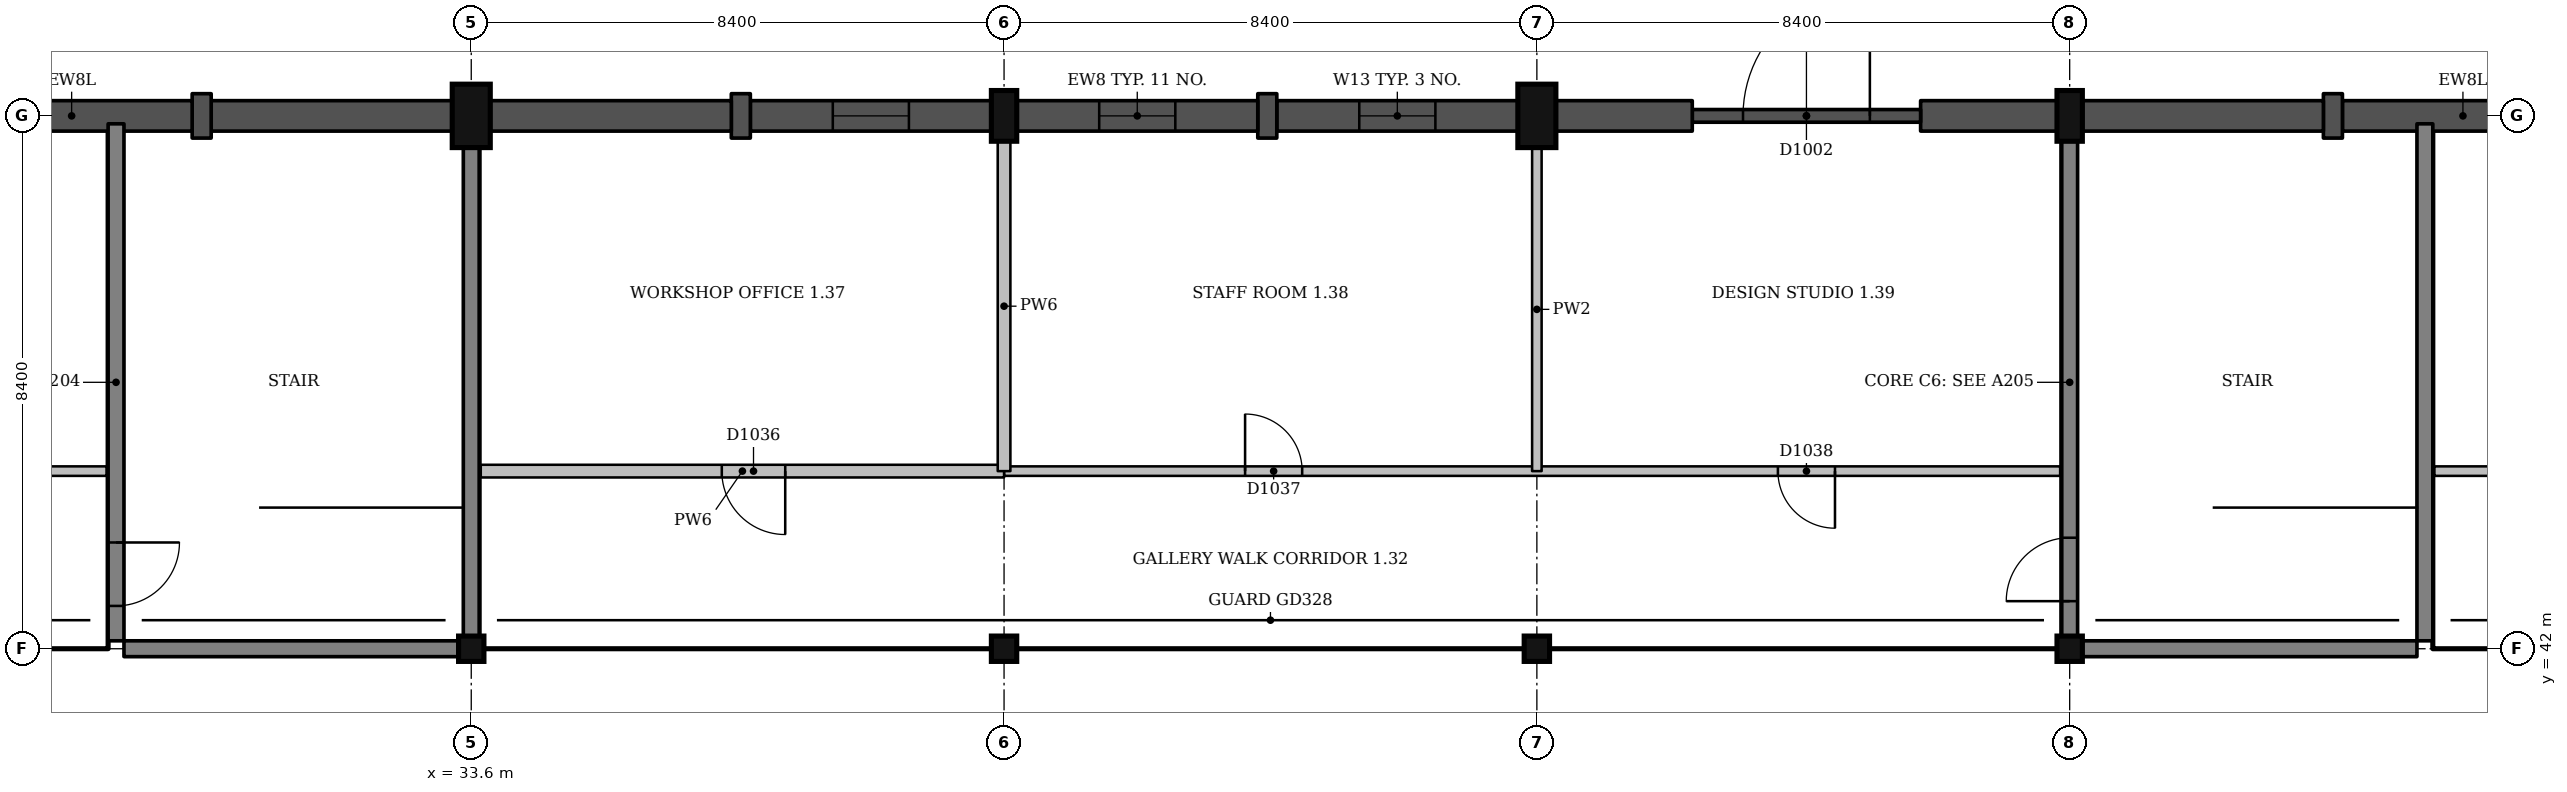
"""IFC4 building model, lengths in metres.
Left out: names, types, materials, properties, quantities, classifications, styles, units other than length and angle.
Written with IfcOpenShell. Run it as: python <this file> out.ifc"""

import sys

from ifc_helpers import new_model, si_unit, direction, frame, frame_2d, origin, origin_2d, place, context, subcontext, project, spatial, rectangle, extrude, element, fill, save


model = new_model("IFC4")
c1 = context("Model", 3, precision=1e-05, world=origin(), true_north=direction((0.0, 1.0)))
c2 = subcontext(c1, "Body", "Model", "MODEL_VIEW")
j1 = project(units=[si_unit("LENGTHUNIT", "METRE"), si_unit("PLANEANGLEUNIT", "RADIAN")], contexts=[c1])
p1 = place(None, origin())
s1 = spatial("IfcSite", under=j1, at=p1, CompositionType="ELEMENT")
p2 = place(p1, origin())
s2 = spatial("IfcBuilding", under=s1, at=p2, CompositionType="ELEMENT")
p3 = place(p2, frame((0.0, 0.0, 4.5)))
s3 = spatial("IfcBuildingStorey", under=s2, at=p3, CompositionType="ELEMENT", Elevation=4.5)
p4 = place(p3, frame((33.6, 42.0, 0.0), z_axis=(0.0, 0.0, 1.0), x_axis=(1.0, 0.0, 0.0)))
e1 = element("IfcColumn", 1, at=p4, inside=s3, PredefinedType="COLUMN", context=c2, shape_type="SweptSolid", body=[
    extrude(rectangle(XDim=0.4, YDim=0.4, at=origin_2d()), origin(), (0.0, 0.0, 1.0), 4.5),
])
p5 = place(p3, frame((33.6, 50.4, 0.0), z_axis=(0.0, 0.0, 1.0), x_axis=(1.0, 0.0, 0.0)))
e2 = element("IfcColumn", 2, at=p5, inside=s3, PredefinedType="COLUMN", context=c2, shape_type="SweptSolid", body=[
    extrude(rectangle(XDim=0.6, YDim=1.0, at=origin_2d()), origin(), (0.0, 0.0, 1.0), 4.5),
])
p6 = place(p3, frame((42.0, 42.0, 0.0), z_axis=(0.0, 0.0, 1.0), x_axis=(1.0, 0.0, 0.0)))
e3 = element("IfcColumn", 3, at=p6, inside=s3, PredefinedType="COLUMN", context=c2, shape_type="SweptSolid", body=[
    extrude(rectangle(XDim=0.4, YDim=0.4, at=origin_2d()), origin(), (0.0, 0.0, 1.0), 4.5),
])
p7 = place(p3, frame((42.0, 50.4, 0.0), z_axis=(0.0, 0.0, 1.0), x_axis=(1.0, 0.0, 0.0)))
e4 = element("IfcColumn", 4, at=p7, inside=s3, PredefinedType="COLUMN", context=c2, shape_type="SweptSolid", body=[
    extrude(rectangle(XDim=0.4, YDim=0.8, at=origin_2d()), origin(), (0.0, 0.0, 1.0), 4.5),
])
p8 = place(p3, frame((50.4, 42.0, 0.0), z_axis=(0.0, 0.0, 1.0), x_axis=(1.0, 0.0, 0.0)))
e5 = element("IfcColumn", 5, at=p8, inside=s3, PredefinedType="COLUMN", context=c2, shape_type="SweptSolid", body=[
    extrude(rectangle(XDim=0.4, YDim=0.4, at=origin_2d()), origin(), (0.0, 0.0, 1.0), 4.5),
])
p9 = place(p3, frame((50.4, 50.4, 0.0), z_axis=(0.0, 0.0, 1.0), x_axis=(1.0, 0.0, 0.0)))
e6 = element("IfcColumn", 6, at=p9, inside=s3, PredefinedType="COLUMN", context=c2, shape_type="SweptSolid", body=[
    extrude(rectangle(XDim=0.6, YDim=1.0, at=origin_2d()), origin(), (0.0, 0.0, 1.0), 4.5),
])
p10 = place(p3, frame((58.8, 42.0, 0.0), z_axis=(0.0, 0.0, 1.0), x_axis=(1.0, 0.0, 0.0)))
e7 = element("IfcColumn", 7, at=p10, inside=s3, PredefinedType="COLUMN", context=c2, shape_type="SweptSolid", body=[
    extrude(rectangle(XDim=0.4, YDim=0.4, at=origin_2d()), origin(), (0.0, 0.0, 1.0), 4.5),
])
p11 = place(p3, frame((58.8, 50.4, 0.0), z_axis=(0.0, 0.0, 1.0), x_axis=(1.0, 0.0, 0.0)))
e8 = element("IfcColumn", 8, at=p11, inside=s3, PredefinedType="COLUMN", context=c2, shape_type="SweptSolid", body=[
    extrude(rectangle(XDim=0.4, YDim=0.8, at=origin_2d()), origin(), (0.0, 0.0, 1.0), 4.5),
])
p12 = place(p3, frame((28.0, 42.125, 0.0), z_axis=(0.0, 0.0, 1.0), x_axis=(0.0, 1.0, 0.0)))
e9 = element("IfcWall", 9, at=p12, inside=s3, PredefinedType="SHEAR", context=c2, shape_type="SweptSolid", body=[
    extrude(rectangle(XDim=8.15, YDim=0.25, at=frame_2d((4.075, 0.0))), origin(), (0.0, 0.0, 1.0), 4.5),
])
p13 = place(p12, frame((0.55, 0.0, 0.0)))
e10 = element("IfcOpeningElement", 10, at=p13, cuts=e9, PredefinedType="OPENING", context=c2, shape_type="SweptSolid", body=[
    extrude(rectangle(XDim=1.0, YDim=2.1, at=frame_2d((0.5, 1.05))), frame((0.0, 0.135, 0.0), z_axis=(0.0, -1.0, 0.0), x_axis=(1.0, 0.0, 0.0)), (0.0, 0.0, 1.0), 0.27),
])
p14 = place(p3, frame((33.6, 42.2, 0.0), z_axis=(0.0, 0.0, 1.0), x_axis=(0.0, 1.0, 0.0)))
e11 = element("IfcWall", 11, at=p14, inside=s3, PredefinedType="SHEAR", context=c2, shape_type="SweptSolid", body=[
    extrude(rectangle(XDim=7.7, YDim=0.25, at=frame_2d((3.85, 0.0))), origin(), (0.0, 0.0, 1.0), 4.5),
])
p15 = place(p3, frame((58.8, 42.2, 0.0), z_axis=(0.0, 0.0, 1.0), x_axis=(0.0, 1.0, 0.0)))
e12 = element("IfcWall", 12, at=p15, inside=s3, PredefinedType="SHEAR", context=c2, shape_type="SweptSolid", body=[
    extrude(rectangle(XDim=7.8, YDim=0.25, at=frame_2d((3.9, 0.0))), origin(), (0.0, 0.0, 1.0), 4.5),
])
p16 = place(p15, frame((0.55, 0.0, 0.0)))
e13 = element("IfcOpeningElement", 13, at=p16, cuts=e12, PredefinedType="OPENING", context=c2, shape_type="SweptSolid", body=[
    extrude(rectangle(XDim=1.0, YDim=2.1, at=frame_2d((0.5, 1.05))), frame((0.0, 0.135, 0.0), z_axis=(0.0, -1.0, 0.0), x_axis=(1.0, 0.0, 0.0)), (0.0, 0.0, 1.0), 0.27),
])
p17 = place(p3, frame((64.4, 42.125, 0.0), z_axis=(0.0, 0.0, 1.0), x_axis=(0.0, 1.0, 0.0)))
e14 = element("IfcWall", 14, at=p17, inside=s3, PredefinedType="SHEAR", context=c2, shape_type="SweptSolid", body=[
    extrude(rectangle(XDim=8.15, YDim=0.25, at=frame_2d((4.075, 0.0))), origin(), (0.0, 0.0, 1.0), 4.5),
])
p18 = place(p3, frame((66.9, 50.4, 0.0), z_axis=(0.0, 0.0, 1.0), x_axis=(-1.0, 0.0, 0.0)))
e15 = element("IfcWall", 15, at=p18, inside=s3, PredefinedType="SOLIDWALL", context=c2, shape_type="SweptSolid", body=[
    extrude(rectangle(XDim=3.8, YDim=0.48, at=frame_2d((1.9, 0.0))), origin(), (0.0, 0.0, 1.0), 3.75),
])
p19 = place(p3, frame((63.1, 50.4, 0.0), z_axis=(0.0, 0.0, 1.0), x_axis=(-1.0, 0.0, 0.0)))
e16 = element("IfcWall", 16, at=p19, inside=s3, PredefinedType="SOLIDWALL", context=c2, shape_type="SweptSolid", body=[
    extrude(rectangle(XDim=0.3, YDim=0.7, at=frame_2d((0.15, 0.0))), origin(), (0.0, 0.0, 1.0), 3.75),
])
p20 = place(p3, frame((62.8, 50.4, 0.0), z_axis=(0.0, 0.0, 1.0), x_axis=(-1.0, 0.0, 0.0)))
e17 = element("IfcWall", 17, at=p20, inside=s3, PredefinedType="SOLIDWALL", context=c2, shape_type="SweptSolid", body=[
    extrude(rectangle(XDim=3.8, YDim=0.48, at=frame_2d((1.9, 0.0))), origin(), (0.0, 0.0, 1.0), 3.75),
])
p21 = place(p3, frame((58.6, 50.4, 0.0), z_axis=(0.0, 0.0, 1.0), x_axis=(-1.0, 0.0, 0.0)))
e18 = element("IfcWall", 18, at=p21, inside=s3, PredefinedType="SOLIDWALL", context=c2, shape_type="SweptSolid", body=[
    extrude(rectangle(XDim=2.15, YDim=0.48, at=frame_2d((1.075, 0.0))), origin(), (0.0, 0.0, 1.0), 3.75),
])
p22 = place(p3, frame((56.45, 50.4, 0.0), z_axis=(0.0, 0.0, 1.0), x_axis=(-1.0, 0.0, 0.0)))
e19 = element("IfcWall", 19, at=p22, inside=s3, PredefinedType="SOLIDWALL", context=c2, shape_type="SweptSolid", body=[
    extrude(rectangle(XDim=3.6, YDim=0.2, at=frame_2d((1.8, 0.0))), origin(), (0.0, 0.0, 1.0), 3.75),
])
p23 = place(p22, frame((0.8, 0.0, 0.0)))
e20 = element("IfcOpeningElement", 20, at=p23, cuts=e19, PredefinedType="OPENING", context=c2, shape_type="SweptSolid", body=[
    extrude(rectangle(XDim=2.0, YDim=2.4, at=frame_2d((1.0, 1.2))), frame((0.0, 0.11, 0.0), z_axis=(0.0, -1.0, 0.0), x_axis=(1.0, 0.0, 0.0)), (0.0, 0.0, 1.0), 0.22),
])
p24 = place(p3, frame((52.85, 50.4, 0.0), z_axis=(0.0, 0.0, 1.0), x_axis=(-1.0, 0.0, 0.0)))
e21 = element("IfcWall", 21, at=p24, inside=s3, PredefinedType="SOLIDWALL", context=c2, shape_type="SweptSolid", body=[
    extrude(rectangle(XDim=2.15, YDim=0.48, at=frame_2d((1.075, 0.0))), origin(), (0.0, 0.0, 1.0), 3.75),
])
p25 = place(p3, frame((50.1, 50.4, 0.0), z_axis=(0.0, 0.0, 1.0), x_axis=(-1.0, 0.0, 0.0)))
e22 = element("IfcWall", 22, at=p25, inside=s3, PredefinedType="SOLIDWALL", context=c2, shape_type="SweptSolid", body=[
    extrude(rectangle(XDim=3.8, YDim=0.48, at=frame_2d((1.9, 0.0))), origin(), (0.0, 0.0, 1.0), 3.75),
])
p26 = place(p25, frame((1.3, 0.0, 0.9)))
e23 = element("IfcOpeningElement", 23, at=p26, cuts=e22, PredefinedType="OPENING", context=c2, shape_type="SweptSolid", body=[
    extrude(rectangle(XDim=1.2, YDim=2.1, at=frame_2d((0.6, 1.05))), frame((0.0, 0.25, 0.0), z_axis=(0.0, -1.0, 0.0), x_axis=(1.0, 0.0, 0.0)), (0.0, 0.0, 1.0), 0.5),
])
p27 = place(p3, frame((46.3, 50.4, 0.0), z_axis=(0.0, 0.0, 1.0), x_axis=(-1.0, 0.0, 0.0)))
e24 = element("IfcWall", 24, at=p27, inside=s3, PredefinedType="SOLIDWALL", context=c2, shape_type="SweptSolid", body=[
    extrude(rectangle(XDim=0.3, YDim=0.7, at=frame_2d((0.15, 0.0))), origin(), (0.0, 0.0, 1.0), 3.75),
])
p28 = place(p3, frame((46.0, 50.4, 0.0), z_axis=(0.0, 0.0, 1.0), x_axis=(-1.0, 0.0, 0.0)))
e25 = element("IfcWall", 25, at=p28, inside=s3, PredefinedType="SOLIDWALL", context=c2, shape_type="SweptSolid", body=[
    extrude(rectangle(XDim=3.8, YDim=0.48, at=frame_2d((1.9, 0.0))), origin(), (0.0, 0.0, 1.0), 3.75),
])
p29 = place(p28, frame((1.3, 0.0, 0.9)))
e26 = element("IfcOpeningElement", 26, at=p29, cuts=e25, PredefinedType="OPENING", context=c2, shape_type="SweptSolid", body=[
    extrude(rectangle(XDim=1.2, YDim=2.1, at=frame_2d((0.6, 1.05))), frame((0.0, 0.25, 0.0), z_axis=(0.0, -1.0, 0.0), x_axis=(1.0, 0.0, 0.0)), (0.0, 0.0, 1.0), 0.5),
])
p30 = place(p3, frame((41.8, 50.4, 0.0), z_axis=(0.0, 0.0, 1.0), x_axis=(-1.0, 0.0, 0.0)))
e27 = element("IfcWall", 27, at=p30, inside=s3, PredefinedType="SOLIDWALL", context=c2, shape_type="SweptSolid", body=[
    extrude(rectangle(XDim=3.8, YDim=0.48, at=frame_2d((1.9, 0.0))), origin(), (0.0, 0.0, 1.0), 3.75),
])
p31 = place(p30, frame((1.3, 0.0, 0.9)))
e28 = element("IfcOpeningElement", 28, at=p31, cuts=e27, PredefinedType="OPENING", context=c2, shape_type="SweptSolid", body=[
    extrude(rectangle(XDim=1.2, YDim=2.1, at=frame_2d((0.6, 1.05))), frame((0.0, 0.25, 0.0), z_axis=(0.0, -1.0, 0.0), x_axis=(1.0, 0.0, 0.0)), (0.0, 0.0, 1.0), 0.5),
])
p32 = place(p3, frame((38.0, 50.4, 0.0), z_axis=(0.0, 0.0, 1.0), x_axis=(-1.0, 0.0, 0.0)))
e29 = element("IfcWall", 29, at=p32, inside=s3, PredefinedType="SOLIDWALL", context=c2, shape_type="SweptSolid", body=[
    extrude(rectangle(XDim=0.3, YDim=0.7, at=frame_2d((0.15, 0.0))), origin(), (0.0, 0.0, 1.0), 3.75),
])
for number, where, z_axis, x_axis in (
    (30, (37.7, 50.4, 0.0), (0.0, 0.0, 1.0), (-1.0, 0.0, 0.0)),
    (31, (33.3, 50.4, 0.0), (0.0, 0.0, 1.0), (-1.0, 0.0, 0.0)),
):
    element("IfcWall", number, at=place(p3, frame(where, z_axis=z_axis, x_axis=x_axis)), inside=s3, PredefinedType="SOLIDWALL", context=c2, shape_type="SweptSolid", body=[
        extrude(rectangle(XDim=3.8, YDim=0.48, at=frame_2d((1.9, 0.0))), origin(), (0.0, 0.0, 1.0), 3.75),
    ])
p33 = place(p3, frame((29.5, 50.4, 0.0), z_axis=(0.0, 0.0, 1.0), x_axis=(-1.0, 0.0, 0.0)))
e32 = element("IfcWall", 32, at=p33, inside=s3, PredefinedType="SOLIDWALL", context=c2, shape_type="SweptSolid", body=[
    extrude(rectangle(XDim=0.3, YDim=0.7, at=frame_2d((0.15, 0.0))), origin(), (0.0, 0.0, 1.0), 3.75),
])
p34 = place(p3, frame((29.2, 50.4, 0.0), z_axis=(0.0, 0.0, 1.0), x_axis=(-1.0, 0.0, 0.0)))
e33 = element("IfcWall", 33, at=p34, inside=s3, PredefinedType="SOLIDWALL", context=c2, shape_type="SweptSolid", body=[
    extrude(rectangle(XDim=3.8, YDim=0.48, at=frame_2d((1.9, 0.0))), origin(), (0.0, 0.0, 1.0), 3.75),
])
p35 = place(p3, frame((5.75, 44.8, 0.0), z_axis=(0.0, 0.0, 1.0), x_axis=(1.0, 0.0, 0.0)))
e34 = element("IfcWall", 34, at=p35, inside=s3, PredefinedType="PARTITIONING", context=c2, shape_type="SweptSolid", body=[
    extrude(rectangle(XDim=22.1, YDim=0.15, at=frame_2d((11.05, 0.0))), origin(), (0.0, 0.0, 1.0), 4.15),
])
p36 = place(p35, frame((5.2, 0.0, 0.0)))
e35 = element("IfcOpeningElement", 35, at=p36, cuts=e34, PredefinedType="OPENING", context=c2, shape_type="SweptSolid", body=[
    extrude(rectangle(XDim=0.9, YDim=2.1, at=frame_2d((0.45, 1.05))), frame((0.0, 0.085, 0.0), z_axis=(0.0, -1.0, 0.0), x_axis=(1.0, 0.0, 0.0)), (0.0, 0.0, 1.0), 0.17),
])
p37 = place(p35, frame((16.25, 0.0, 0.0)))
e36 = element("IfcOpeningElement", 36, at=p37, cuts=e34, PredefinedType="OPENING", context=c2, shape_type="SweptSolid", body=[
    extrude(rectangle(XDim=0.9, YDim=2.1, at=frame_2d((0.45, 1.05))), frame((0.0, 0.085, 0.0), z_axis=(0.0, -1.0, 0.0), x_axis=(1.0, 0.0, 0.0)), (0.0, 0.0, 1.0), 0.17),
])
p38 = place(p3, frame((42.0, 44.8, 0.0), z_axis=(0.0, 0.0, 1.0), x_axis=(1.0, 0.0, 0.0)))
e37 = element("IfcWall", 37, at=p38, inside=s3, PredefinedType="PARTITIONING", context=c2, shape_type="SweptSolid", body=[
    extrude(rectangle(XDim=16.65, YDim=0.15, at=frame_2d((8.325, 0.0))), origin(), (0.0, 0.0, 1.0), 4.15),
])
p39 = place(p38, frame((3.8, 0.0, 0.0)))
e38 = element("IfcOpeningElement", 38, at=p39, cuts=e37, PredefinedType="OPENING", context=c2, shape_type="SweptSolid", body=[
    extrude(rectangle(XDim=0.9, YDim=2.1, at=frame_2d((0.45, 1.05))), frame((0.0, 0.085, 0.0), z_axis=(0.0, -1.0, 0.0), x_axis=(1.0, 0.0, 0.0)), (0.0, 0.0, 1.0), 0.17),
])
p40 = place(p38, frame((12.2, 0.0, 0.0)))
e39 = element("IfcOpeningElement", 39, at=p40, cuts=e37, PredefinedType="OPENING", context=c2, shape_type="SweptSolid", body=[
    extrude(rectangle(XDim=0.9, YDim=2.1, at=frame_2d((0.45, 1.05))), frame((0.0, 0.085, 0.0), z_axis=(0.0, -1.0, 0.0), x_axis=(1.0, 0.0, 0.0)), (0.0, 0.0, 1.0), 0.17),
])
p41 = place(p3, frame((64.55, 44.8, 0.0), z_axis=(0.0, 0.0, 1.0), x_axis=(1.0, 0.0, 0.0)))
e40 = element("IfcWall", 40, at=p41, inside=s3, PredefinedType="PARTITIONING", context=c2, shape_type="SweptSolid", body=[
    extrude(rectangle(XDim=11.05, YDim=0.15, at=frame_2d((5.525, 0.0))), origin(), (0.0, 0.0, 1.0), 4.15),
])
p42 = place(p41, frame((5.2, 0.0, 0.0)))
e41 = element("IfcOpeningElement", 41, at=p42, cuts=e40, PredefinedType="OPENING", context=c2, shape_type="SweptSolid", body=[
    extrude(rectangle(XDim=0.9, YDim=2.1, at=frame_2d((0.45, 1.05))), frame((0.0, 0.085, 0.0), z_axis=(0.0, -1.0, 0.0), x_axis=(1.0, 0.0, 0.0)), (0.0, 0.0, 1.0), 0.17),
])
p43 = place(p3, frame((33.75, 44.8, 0.0), z_axis=(0.0, 0.0, 1.0), x_axis=(1.0, 0.0, 0.0)))
e42 = element("IfcWall", 42, at=p43, inside=s3, PredefinedType="PARTITIONING", context=c2, shape_type="SweptSolid", body=[
    extrude(rectangle(XDim=8.25, YDim=0.2, at=frame_2d((4.125, 0.0))), origin(), (0.0, 0.0, 1.0), 4.15),
])
p44 = place(p43, frame((3.8, 0.0, 0.0)))
e43 = element("IfcOpeningElement", 43, at=p44, cuts=e42, PredefinedType="OPENING", context=c2, shape_type="SweptSolid", body=[
    extrude(rectangle(XDim=1.0, YDim=2.1, at=frame_2d((0.5, 1.05))), frame((0.0, 0.11, 0.0), z_axis=(0.0, -1.0, 0.0), x_axis=(1.0, 0.0, 0.0)), (0.0, 0.0, 1.0), 0.22),
])
p45 = place(p3, frame((42.0, 44.8, 0.0), z_axis=(0.0, 0.0, 1.0), x_axis=(0.0, 1.0, 0.0)))
e44 = element("IfcWall", 44, at=p45, inside=s3, PredefinedType="PARTITIONING", context=c2, shape_type="SweptSolid", body=[
    extrude(rectangle(XDim=5.2, YDim=0.2, at=frame_2d((2.6, 0.0))), origin(), (0.0, 0.0, 1.0), 2.489),
])
p46 = place(p3, frame((50.4, 44.8, 0.0), z_axis=(0.0, 0.0, 1.0), x_axis=(0.0, 1.0, 0.0)))
e45 = element("IfcWall", 45, at=p46, inside=s3, PredefinedType="PARTITIONING", context=c2, shape_type="SweptSolid", body=[
    extrude(rectangle(XDim=5.1, YDim=0.15, at=frame_2d((2.55, 0.0))), origin(), (0.0, 0.0, 1.0), 2.489),
])
for number, where, z_axis, x_axis in (
    (46, (28.125, 42.0, 0.0), (0.0, 0.0, 1.0), (1.0, 0.0, 0.0)),
    (47, (59.0, 42.0, 0.0), (0.0, 0.0, 1.0), (1.0, 0.0, 0.0)),
):
    element("IfcWall", number, at=place(p3, frame(where, z_axis=z_axis, x_axis=x_axis)), inside=s3, PredefinedType="SHEAR", context=c2, shape_type="SweptSolid", body=[
        extrude(rectangle(XDim=5.275, YDim=0.25, at=frame_2d((2.637, 0.0))), origin(), (0.0, 0.0, 1.0), 4.5),
    ])
p47 = place(p23, origin())
e48 = element("IfcDoor", 48, at=p47, inside=s3, OperationType="SINGLE_SWING_LEFT", PredefinedType="DOOR", context=c2, shape_type="SweptSolid", body=[
    extrude(rectangle(XDim=2.0, YDim=2.4, at=frame_2d((1.0, 1.2))), frame((0.0, 0.025, 0.0), z_axis=(0.0, -1.0, 0.0), x_axis=(1.0, 0.0, 0.0)), (0.0, 0.0, 1.0), 0.05),
])
fill(e20, e48)
p48 = place(p26, origin())
e49 = element("IfcWindow", 49, at=p48, inside=s3, PartitioningType="SINGLE_PANEL", PredefinedType="WINDOW", context=c2, shape_type="SweptSolid", body=[
    extrude(rectangle(XDim=1.2, YDim=2.1, at=frame_2d((0.6, 1.05))), frame((0.0, 0.12, 0.0), z_axis=(0.0, -1.0, 0.0), x_axis=(1.0, 0.0, 0.0)), (0.0, 0.0, 1.0), 0.06),
])
fill(e23, e49)
p49 = place(p29, origin())
e50 = element("IfcWindow", 50, at=p49, inside=s3, PartitioningType="SINGLE_PANEL", PredefinedType="WINDOW", context=c2, shape_type="SweptSolid", body=[
    extrude(rectangle(XDim=1.2, YDim=2.1, at=frame_2d((0.6, 1.05))), frame((0.0, 0.12, 0.0), z_axis=(0.0, -1.0, 0.0), x_axis=(1.0, 0.0, 0.0)), (0.0, 0.0, 1.0), 0.06),
])
fill(e26, e50)
p50 = place(p31, origin())
e51 = element("IfcWindow", 51, at=p50, inside=s3, PartitioningType="SINGLE_PANEL", PredefinedType="WINDOW", context=c2, shape_type="SweptSolid", body=[
    extrude(rectangle(XDim=1.2, YDim=2.1, at=frame_2d((0.6, 1.05))), frame((0.0, 0.12, 0.0), z_axis=(0.0, -1.0, 0.0), x_axis=(1.0, 0.0, 0.0)), (0.0, 0.0, 1.0), 0.06),
])
fill(e28, e51)
p51 = place(p44, origin())
e52 = element("IfcDoor", 52, at=p51, inside=s3, OperationType="SINGLE_SWING_RIGHT", PredefinedType="DOOR", context=c2, shape_type="SweptSolid", body=[
    extrude(rectangle(XDim=1.0, YDim=2.1, at=frame_2d((0.5, 1.05))), frame((0.0, 0.025, 0.0), z_axis=(0.0, -1.0, 0.0), x_axis=(1.0, 0.0, 0.0)), (0.0, 0.0, 1.0), 0.05),
])
fill(e43, e52)
p52 = place(p39, origin())
e53 = element("IfcDoor", 53, at=p52, inside=s3, OperationType="SINGLE_SWING_LEFT", PredefinedType="DOOR", context=c2, shape_type="SweptSolid", body=[
    extrude(rectangle(XDim=0.9, YDim=2.1, at=frame_2d((0.45, 1.05))), frame((0.0, 0.025, 0.0), z_axis=(0.0, -1.0, 0.0), x_axis=(1.0, 0.0, 0.0)), (0.0, 0.0, 1.0), 0.05),
])
fill(e38, e53)
p53 = place(p40, origin())
e54 = element("IfcDoor", 54, at=p53, inside=s3, OperationType="SINGLE_SWING_RIGHT", PredefinedType="DOOR", context=c2, shape_type="SweptSolid", body=[
    extrude(rectangle(XDim=0.9, YDim=2.1, at=frame_2d((0.45, 1.05))), frame((0.0, 0.025, 0.0), z_axis=(0.0, -1.0, 0.0), x_axis=(1.0, 0.0, 0.0)), (0.0, 0.0, 1.0), 0.05),
])
fill(e39, e54)
p54 = place(p13, origin())
e55 = element("IfcDoor", 55, at=p54, inside=s3, OperationType="SINGLE_SWING_RIGHT", PredefinedType="DOOR", context=c2, shape_type="SweptSolid", body=[
    extrude(rectangle(XDim=1.0, YDim=2.1, at=frame_2d((0.5, 1.05))), frame((0.0, 0.025, 0.0), z_axis=(0.0, -1.0, 0.0), x_axis=(1.0, 0.0, 0.0)), (0.0, 0.0, 1.0), 0.05),
])
fill(e10, e55)
p55 = place(p16, origin())
e56 = element("IfcDoor", 56, at=p55, inside=s3, OperationType="SINGLE_SWING_LEFT", PredefinedType="DOOR", context=c2, shape_type="SweptSolid", body=[
    extrude(rectangle(XDim=1.0, YDim=2.1, at=frame_2d((0.5, 1.05))), frame((0.0, 0.025, 0.0), z_axis=(0.0, -1.0, 0.0), x_axis=(1.0, 0.0, 0.0)), (0.0, 0.0, 1.0), 0.05),
])
fill(e13, e56)
save(model, sys.argv[1])
